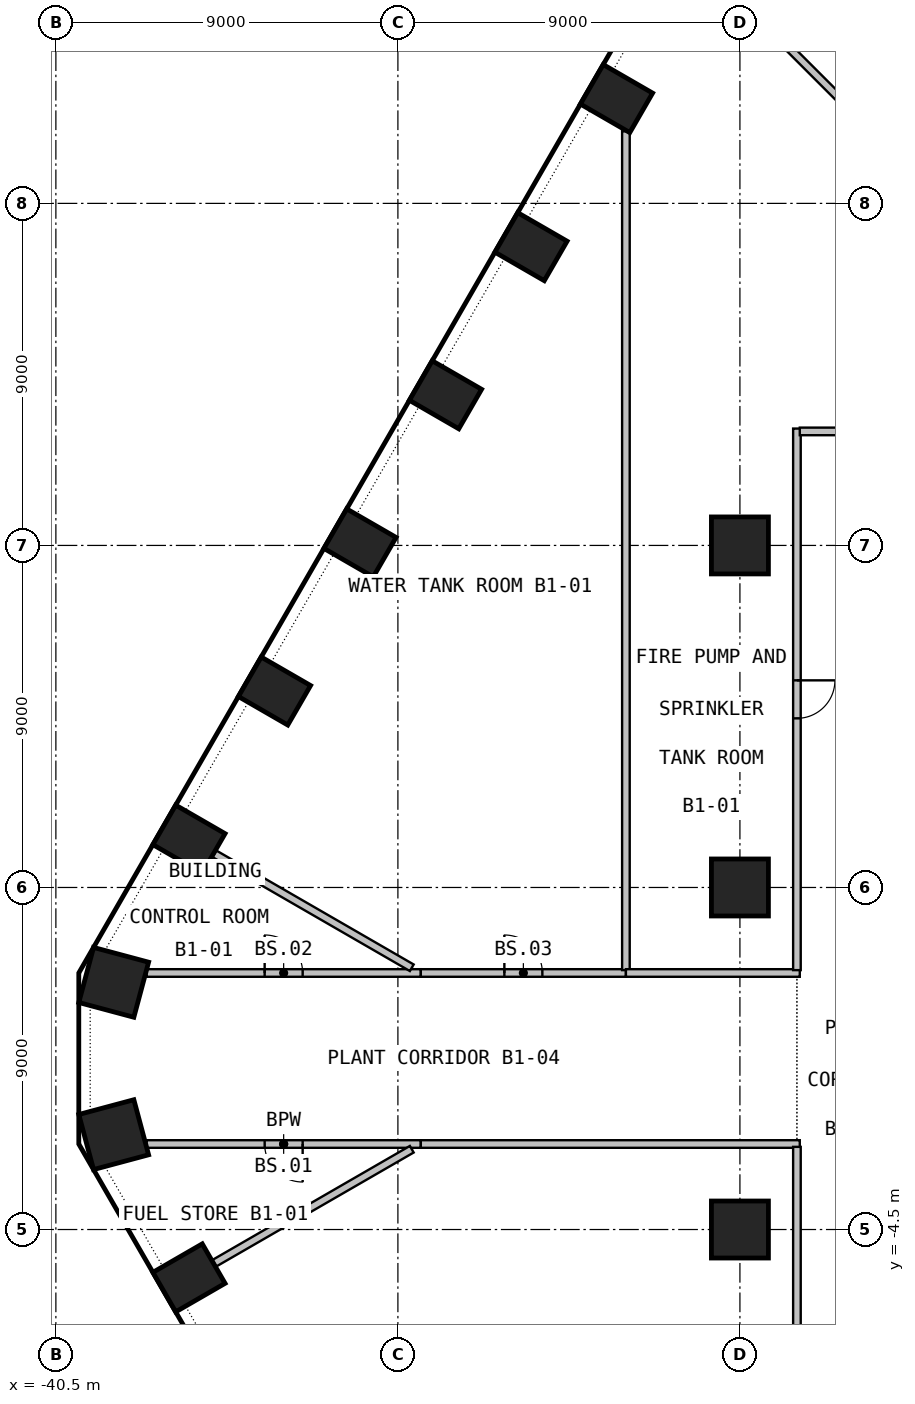
"""IFC4 building model, lengths in metres.
Left out: names, types, materials, properties, quantities, classifications, styles, units other than length and angle.
Written with IfcOpenShell. Run it as: python <this file> out.ifc"""

import sys

from ifc_helpers import new_model, si_unit, direction, frame, frame_2d, origin, origin_2d, place, context, subcontext, project, spatial, rectangle, circle, extrude, element, fill, save


model = new_model("IFC4")
c1 = context("Model", 3, precision=1e-05, world=origin(), true_north=direction((0.0, 1.0)))
c2 = subcontext(c1, "Body", "Model", "MODEL_VIEW")
j1 = project(units=[si_unit("LENGTHUNIT", "METRE"), si_unit("PLANEANGLEUNIT", "RADIAN")], contexts=[c1])
p1 = place(None, origin())
s1 = spatial("IfcSite", under=j1, at=p1, CompositionType="ELEMENT")
p2 = place(p1, origin())
s2 = spatial("IfcBuilding", under=s1, at=p2, CompositionType="ELEMENT")
p3 = place(p2, frame((0.0, 0.0, -5.0)))
s3 = spatial("IfcBuildingStorey", under=s2, at=p3, CompositionType="ELEMENT", Elevation=-5.0)
for number, where, z_axis, x_axis in (
    (1, (-25.748, 25.258, 0.0), (0.0, 0.0, 1.0), (-0.5, -0.866, 0.0)),
    (2, (-27.998, 21.361, 0.0), (0.0, 0.0, 1.0), (-0.5, -0.866, 0.0)),
    (3, (-30.248, 17.463, 0.0), (0.0, 0.0, 1.0), (-0.5, -0.866, 0.0)),
    (4, (-32.498, 13.566, 0.0), (0.0, 0.0, 1.0), (-0.5, -0.866, 0.0)),
    (5, (-34.748, 9.669, 0.0), (0.0, 0.0, 1.0), (-0.5, -0.866, 0.0)),
    (6, (-36.998, 5.772, 0.0), (0.0, 0.0, 1.0), (-0.5, -0.866, 0.0)),
):
    element("IfcColumn", number, at=place(p3, frame(where, z_axis=z_axis, x_axis=x_axis)), inside=s3, PredefinedType="COLUMN", context=c2, shape_type="SweptSolid", body=[
        extrude(rectangle(XDim=1.2, YDim=1.5, at=origin_2d()), origin(), (0.0, 0.0, 1.0), 4.55),
    ])
for number, where, z_axis, x_axis in (
    (7, (-38.979, 2.004, 0.0), (0.0, 0.0, 1.0), (-0.259, -0.966, 0.0)),
    (8, (-38.979, -2.004, 0.0), (0.0, 0.0, 1.0), (0.259, -0.966, 0.0)),
):
    element("IfcColumn", number, at=place(p3, frame(where, z_axis=z_axis, x_axis=x_axis)), inside=s3, PredefinedType="COLUMN", context=c2, shape_type="SweptSolid", body=[
        extrude(rectangle(XDim=1.5, YDim=1.5, at=origin_2d()), origin(), (0.0, 0.0, 1.0), 4.55),
    ])
p4 = place(p3, frame((-36.998, -5.772, 0.0), z_axis=(0.0, 0.0, 1.0), x_axis=(0.5, -0.866025403784, 0.0)))
e9 = element("IfcColumn", 9, at=p4, inside=s3, PredefinedType="COLUMN", context=c2, shape_type="SweptSolid", body=[
    extrude(rectangle(XDim=1.2, YDim=1.5, at=origin_2d()), origin(), (0.0, 0.0, 1.0), 4.55),
])
for number, where, z_axis, x_axis in (
    (10, (-22.5, -4.5, 0.0), (0.0, 0.0, 1.0), (1.0, 0.0, 0.0)),
    (11, (-22.5, 4.5, 0.0), (0.0, 0.0, 1.0), (1.0, 0.0, 0.0)),
    (12, (-22.5, 13.5, 0.0), (0.0, 0.0, 1.0), (1.0, 0.0, 0.0)),
):
    element("IfcColumn", number, at=place(p3, frame(where, z_axis=z_axis, x_axis=x_axis)), inside=s3, PredefinedType="COLUMN", context=c2, shape_type="SweptSolid", body=[
        extrude(circle(Radius=0.75, at=origin_2d()), origin(), (0.0, 0.0, 1.0), 4.55),
    ])
p5 = place(p3, frame((-30.897, -2.25, 0.0), z_axis=(0.0, 0.0, 1.0), x_axis=(-1.0, 0.0, 0.0)))
e13 = element("IfcWall", 13, at=p5, inside=s3, PredefinedType="PARTITIONING", context=c2, shape_type="SweptSolid", body=[
    extrude(rectangle(XDim=7.219, YDim=0.2, at=frame_2d((3.609, 0.0))), origin(), (0.0, 0.0, 1.0), 4.55),
])
p6 = place(p5, frame((3.109, 0.0, 0.0)))
e14 = element("IfcOpeningElement", 14, at=p6, cuts=e13, PredefinedType="OPENING", context=c2, shape_type="SweptSolid", body=[
    extrude(rectangle(XDim=1.0, YDim=2.1, at=frame_2d((0.5, 1.05))), frame((0.0, 0.11, 0.0), z_axis=(0.0, -1.0, 0.0), x_axis=(1.0, 0.0, 0.0)), (0.0, 0.0, 1.0), 0.22),
])
p7 = place(p3, frame((-38.115, 2.25, 0.0), z_axis=(0.0, 0.0, 1.0), x_axis=(1.0, 0.0, 0.0)))
e15 = element("IfcWall", 15, at=p7, inside=s3, PredefinedType="PARTITIONING", context=c2, shape_type="SweptSolid", body=[
    extrude(rectangle(XDim=7.219, YDim=0.2, at=frame_2d((3.609, 0.0))), origin(), (0.0, 0.0, 1.0), 4.55),
])
p8 = place(p7, frame((3.109, 0.0, 0.0)))
e16 = element("IfcOpeningElement", 16, at=p8, cuts=e15, PredefinedType="OPENING", context=c2, shape_type="SweptSolid", body=[
    extrude(rectangle(XDim=1.0, YDim=2.1, at=frame_2d((0.5, 1.05))), frame((0.0, 0.11, 0.0), z_axis=(0.0, -1.0, 0.0), x_axis=(1.0, 0.0, 0.0)), (0.0, 0.0, 1.0), 0.22),
])
for number, where, z_axis, x_axis in (
    (17, (-31.135, -2.387, 0.0), (0.0, 0.0, 1.0), (-0.866, -0.5, 0.0)),
    (18, (-36.331, 5.387, 0.0), (0.0, 0.0, 1.0), (0.866, -0.5, 0.0)),
):
    element("IfcWall", number, at=place(p3, frame(where, z_axis=z_axis, x_axis=x_axis)), inside=s3, PredefinedType="PARTITIONING", context=c2, shape_type="SweptSolid", body=[
        extrude(rectangle(XDim=5.999, YDim=0.2, at=frame_2d((3.0, 0.0))), origin(), (0.0, 0.0, 1.0), 4.55),
    ])
p9 = place(p3, frame((-20.925, -2.25, 0.0), z_axis=(0.0, 0.0, 1.0), x_axis=(-1.0, 0.0, 0.0)))
e19 = element("IfcWall", 19, at=p9, inside=s3, PredefinedType="PARTITIONING", context=c2, shape_type="SweptSolid", body=[
    extrude(rectangle(XDim=9.972, YDim=0.2, at=frame_2d((4.986, 0.0))), origin(), (0.0, 0.0, 1.0), 4.55),
])
p10 = place(p3, frame((-30.897, 2.25, 0.0), z_axis=(0.0, 0.0, 1.0), x_axis=(1.0, 0.0, 0.0)))
e20 = element("IfcWall", 20, at=p10, inside=s3, PredefinedType="PARTITIONING", context=c2, shape_type="SweptSolid", body=[
    extrude(rectangle(XDim=5.397, YDim=0.2, at=frame_2d((2.698, 0.0))), origin(), (0.0, 0.0, 1.0), 4.55),
])
p11 = place(p10, frame((2.198, 0.0, 0.0)))
e21 = element("IfcOpeningElement", 21, at=p11, cuts=e20, PredefinedType="OPENING", context=c2, shape_type="SweptSolid", body=[
    extrude(rectangle(XDim=1.0, YDim=2.1, at=frame_2d((0.5, 1.05))), frame((0.0, 0.11, 0.0), z_axis=(0.0, -1.0, 0.0), x_axis=(1.0, 0.0, 0.0)), (0.0, 0.0, 1.0), 0.22),
])
p12 = place(p3, frame((-25.5, 24.399, 0.0), z_axis=(0.0, 0.0, 1.0), x_axis=(0.0, -1.0, 0.0)))
e22 = element("IfcWall", 22, at=p12, inside=s3, PredefinedType="PARTITIONING", context=c2, shape_type="SweptSolid", body=[
    extrude(rectangle(XDim=22.074, YDim=0.2, at=frame_2d((11.037, 0.0))), origin(), (0.0, 0.0, 1.0), 4.55),
])
p13 = place(p3, frame((-25.5, 2.25, 0.0), z_axis=(0.0, 0.0, 1.0), x_axis=(1.0, 0.0, 0.0)))
e23 = element("IfcWall", 23, at=p13, inside=s3, PredefinedType="PARTITIONING", context=c2, shape_type="SweptSolid", body=[
    extrude(rectangle(XDim=4.575, YDim=0.2, at=frame_2d((2.288, 0.0))), origin(), (0.0, 0.0, 1.0), 4.55),
])
p14 = place(p3, frame((-22.93, 28.313, 0.0), z_axis=(0.0, 0.0, 1.0), x_axis=(0.707114137878, -0.707099424419, 0.0)))
e24 = element("IfcWall", 24, at=p14, inside=s3, PredefinedType="PARTITIONING", context=c2, shape_type="SweptSolid", body=[
    extrude(rectangle(XDim=16.593, YDim=0.2, at=frame_2d((8.296, 0.0))), origin(), (0.0, 0.0, 1.0), 4.55),
])
p15 = place(p3, frame((-21.0, -2.325, 0.0), z_axis=(0.0, 0.0, 1.0), x_axis=(0.0, -1.0, 0.0)))
e25 = element("IfcWall", 25, at=p15, inside=s3, PredefinedType="PARTITIONING", context=c2, shape_type="SweptSolid", body=[
    extrude(rectangle(XDim=14.25, YDim=0.2, at=frame_2d((7.125, 0.0))), origin(), (0.0, 0.0, 1.0), 4.55),
])
p16 = place(p15, frame((6.625, 0.0, 0.0)))
e26 = element("IfcOpeningElement", 26, at=p16, cuts=e25, PredefinedType="OPENING", context=c2, shape_type="SweptSolid", body=[
    extrude(rectangle(XDim=1.0, YDim=2.1, at=frame_2d((0.5, 1.05))), frame((0.0, 0.11, 0.0), z_axis=(0.0, -1.0, 0.0), x_axis=(1.0, 0.0, 0.0)), (0.0, 0.0, 1.0), 0.22),
])
p17 = place(p3, frame((-21.0, 16.575, 0.0), z_axis=(0.0, 0.0, 1.0), x_axis=(0.0, -1.0, 0.0)))
e27 = element("IfcWall", 27, at=p17, inside=s3, PredefinedType="PARTITIONING", context=c2, shape_type="SweptSolid", body=[
    extrude(rectangle(XDim=14.25, YDim=0.2, at=frame_2d((7.125, 0.0))), origin(), (0.0, 0.0, 1.0), 4.55),
])
p18 = place(p17, frame((6.625, 0.0, 0.0)))
e28 = element("IfcOpeningElement", 28, at=p18, cuts=e27, PredefinedType="OPENING", context=c2, shape_type="SweptSolid", body=[
    extrude(rectangle(XDim=1.0, YDim=2.1, at=frame_2d((0.5, 1.05))), frame((0.0, 0.11, 0.0), z_axis=(0.0, -1.0, 0.0), x_axis=(1.0, 0.0, 0.0)), (0.0, 0.0, 1.0), 0.22),
])
p19 = place(p3, frame((-11.295, 16.5, 0.0), z_axis=(0.0, 0.0, 1.0), x_axis=(-1.0, 0.0, 0.0)))
e29 = element("IfcWall", 29, at=p19, inside=s3, PredefinedType="PARTITIONING", context=c2, shape_type="SweptSolid", body=[
    extrude(rectangle(XDim=9.63, YDim=0.2, at=frame_2d((4.815, 0.0))), origin(), (0.0, 0.0, 1.0), 4.55),
])
p20 = place(p6, origin())
e30 = element("IfcDoor", 30, at=p20, inside=s3, OperationType="SINGLE_SWING_RIGHT", PredefinedType="DOOR", context=c2, shape_type="SweptSolid", body=[
    extrude(rectangle(XDim=1.0, YDim=2.1, at=frame_2d((0.5, 1.05))), frame((0.0, 0.025, 0.0), z_axis=(0.0, -1.0, 0.0), x_axis=(1.0, 0.0, 0.0)), (0.0, 0.0, 1.0), 0.05),
])
fill(e14, e30)
p21 = place(p8, origin())
e31 = element("IfcDoor", 31, at=p21, inside=s3, OperationType="SINGLE_SWING_RIGHT", PredefinedType="DOOR", context=c2, shape_type="SweptSolid", body=[
    extrude(rectangle(XDim=1.0, YDim=2.1, at=frame_2d((0.5, 1.05))), frame((0.0, 0.025, 0.0), z_axis=(0.0, -1.0, 0.0), x_axis=(1.0, 0.0, 0.0)), (0.0, 0.0, 1.0), 0.05),
])
fill(e16, e31)
p22 = place(p11, origin())
e32 = element("IfcDoor", 32, at=p22, inside=s3, OperationType="SINGLE_SWING_LEFT", PredefinedType="DOOR", context=c2, shape_type="SweptSolid", body=[
    extrude(rectangle(XDim=1.0, YDim=2.1, at=frame_2d((0.5, 1.05))), frame((0.0, 0.025, 0.0), z_axis=(0.0, -1.0, 0.0), x_axis=(1.0, 0.0, 0.0)), (0.0, 0.0, 1.0), 0.05),
])
fill(e21, e32)
p23 = place(p18, origin())
e33 = element("IfcDoor", 33, at=p23, inside=s3, OperationType="SINGLE_SWING_LEFT", PredefinedType="DOOR", context=c2, shape_type="SweptSolid", body=[
    extrude(rectangle(XDim=1.0, YDim=2.1, at=frame_2d((0.5, 1.05))), frame((0.0, 0.025, 0.0), z_axis=(0.0, -1.0, 0.0), x_axis=(1.0, 0.0, 0.0)), (0.0, 0.0, 1.0), 0.05),
])
fill(e28, e33)
save(model, sys.argv[1])
